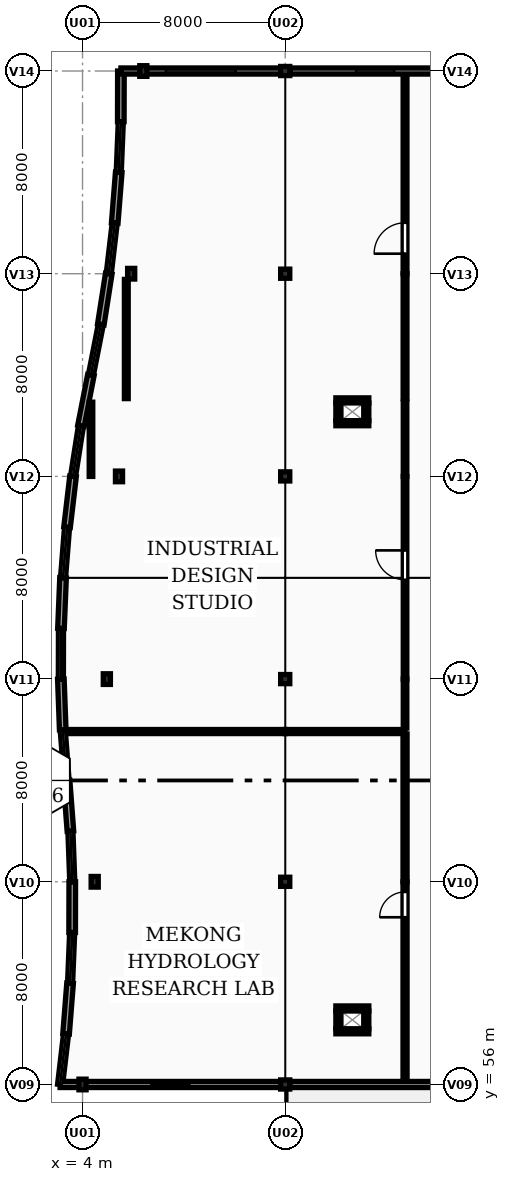
"""IFC4 building model, lengths in metres.
Left out: names, types, materials, properties, quantities, classifications, styles, units other than length and angle.
Written with IfcOpenShell. Run it as: python <this file> out.ifc"""

import sys

from ifc_helpers import new_model, si_unit, direction, frame, frame_2d, origin, origin_2d, place, context, subcontext, project, spatial, rectangle, extrude, element, fill, save


model = new_model("IFC4")
c1 = context("Model", 3, precision=1e-05, world=origin(), true_north=direction((0.0, 1.0)))
c2 = subcontext(c1, "Body", "Model", "MODEL_VIEW")
j1 = project(units=[si_unit("LENGTHUNIT", "METRE"), si_unit("PLANEANGLEUNIT", "RADIAN")], contexts=[c1])
p1 = place(None, origin())
s1 = spatial("IfcSite", under=j1, at=p1, CompositionType="ELEMENT")
p2 = place(p1, origin())
s2 = spatial("IfcBuilding", under=s1, at=p2, CompositionType="ELEMENT")
p3 = place(p2, frame((0.0, 0.0, 12.3)))
s3 = spatial("IfcBuildingStorey", under=s2, at=p3, CompositionType="ELEMENT", Elevation=12.3)
p4 = place(p3, frame((4.0, 56.0, 0.0), z_axis=(0.0, 0.0, 1.0), x_axis=(1.0, 0.0, 0.0)))
e1 = element("IfcColumn", 1, at=p4, inside=s3, PredefinedType="PILASTER", context=c2, shape_type="SweptSolid", body=[
    extrude(rectangle(XDim=0.28, YDim=0.42, at=origin_2d()), origin(), (0.0, 0.0, 1.0), 6.66),
])
p5 = place(p3, frame((4.48, 64.0, 0.0), z_axis=(0.0, 0.0, 1.0), x_axis=(1.0, 0.0, 0.0)))
e2 = element("IfcColumn", 2, at=p5, inside=s3, PredefinedType="PILASTER", context=c2, shape_type="SweptSolid", body=[
    extrude(rectangle(XDim=0.28, YDim=0.42, at=origin_2d()), origin(), (0.0, 0.0, 1.0), 6.11),
])
p6 = place(p3, frame((4.96, 72.0, 0.0), z_axis=(0.0, 0.0, 1.0), x_axis=(1.0, 0.0, 0.0)))
e3 = element("IfcColumn", 3, at=p6, inside=s3, PredefinedType="PILASTER", context=c2, shape_type="SweptSolid", body=[
    extrude(rectangle(XDim=0.28, YDim=0.42, at=origin_2d()), origin(), (0.0, 0.0, 1.0), 5.56),
])
p7 = place(p3, frame((5.44, 80.0, 0.0), z_axis=(0.0, 0.0, 1.0), x_axis=(1.0, 0.0, 0.0)))
e4 = element("IfcColumn", 4, at=p7, inside=s3, PredefinedType="PILASTER", context=c2, shape_type="SweptSolid", body=[
    extrude(rectangle(XDim=0.28, YDim=0.42, at=origin_2d()), origin(), (0.0, 0.0, 1.0), 5.549),
])
p8 = place(p3, frame((5.92, 88.0, 0.0), z_axis=(0.0, 0.0, 1.0), x_axis=(1.0, 0.0, 0.0)))
e5 = element("IfcColumn", 5, at=p8, inside=s3, PredefinedType="PILASTER", context=c2, shape_type="SweptSolid", body=[
    extrude(rectangle(XDim=0.28, YDim=0.42, at=origin_2d()), origin(), (0.0, 0.0, 1.0), 6.078),
])
p9 = place(p3, frame((6.4, 96.0, 0.0), z_axis=(0.0, 0.0, 1.0), x_axis=(1.0, 0.0, 0.0)))
e6 = element("IfcColumn", 6, at=p9, inside=s3, PredefinedType="PILASTER", context=c2, shape_type="SweptSolid", body=[
    extrude(rectangle(XDim=0.28, YDim=0.42, at=origin_2d()), origin(), (0.0, 0.0, 1.0), 6.606),
])
p10 = place(p3, frame((12.0, 56.0, 0.0), z_axis=(0.0, 0.0, 1.0), x_axis=(1.0, 0.0, 0.0)))
e7 = element("IfcColumn", 7, at=p10, inside=s3, PredefinedType="COLUMN", context=c2, shape_type="SweptSolid", body=[
    extrude(rectangle(XDim=0.36, YDim=0.36, at=origin_2d()), origin(), (0.0, 0.0, 1.0), 6.318),
])
p11 = place(p3, frame((12.0, 64.0, 0.0), z_axis=(0.0, 0.0, 1.0), x_axis=(1.0, 0.0, 0.0)))
e8 = element("IfcColumn", 8, at=p11, inside=s3, PredefinedType="COLUMN", context=c2, shape_type="SweptSolid", body=[
    extrude(rectangle(XDim=0.36, YDim=0.36, at=origin_2d()), origin(), (0.0, 0.0, 1.0), 5.789),
])
p12 = place(p3, frame((12.0, 72.0, 0.0), z_axis=(0.0, 0.0, 1.0), x_axis=(1.0, 0.0, 0.0)))
e9 = element("IfcColumn", 9, at=p12, inside=s3, PredefinedType="COLUMN", context=c2, shape_type="SweptSolid", body=[
    extrude(rectangle(XDim=0.36, YDim=0.36, at=origin_2d()), origin(), (0.0, 0.0, 1.0), 5.26),
])
p13 = place(p3, frame((12.0, 80.0, 0.0), z_axis=(0.0, 0.0, 1.0), x_axis=(1.0, 0.0, 0.0)))
e10 = element("IfcColumn", 10, at=p13, inside=s3, PredefinedType="COLUMN", context=c2, shape_type="SweptSolid", body=[
    extrude(rectangle(XDim=0.36, YDim=0.36, at=origin_2d()), origin(), (0.0, 0.0, 1.0), 5.269),
])
p14 = place(p3, frame((12.0, 88.0, 0.0), z_axis=(0.0, 0.0, 1.0), x_axis=(1.0, 0.0, 0.0)))
e11 = element("IfcColumn", 11, at=p14, inside=s3, PredefinedType="COLUMN", context=c2, shape_type="SweptSolid", body=[
    extrude(rectangle(XDim=0.36, YDim=0.36, at=origin_2d()), origin(), (0.0, 0.0, 1.0), 5.818),
])
p15 = place(p3, frame((12.0, 96.0, 0.0), z_axis=(0.0, 0.0, 1.0), x_axis=(1.0, 0.0, 0.0)))
e12 = element("IfcColumn", 12, at=p15, inside=s3, PredefinedType="COLUMN", context=c2, shape_type="SweptSolid", body=[
    extrude(rectangle(XDim=0.36, YDim=0.36, at=origin_2d()), origin(), (0.0, 0.0, 1.0), 6.367),
])
p16 = place(p3, frame((3.115, 56.0, 0.0), z_axis=(0.0, 0.0, 1.0), x_axis=(0.116988959085, 0.99313321536, 0.0)))
e13 = element("IfcWall", 13, at=p16, inside=s3, PredefinedType="SOLIDWALL", context=c2, shape_type="SweptSolid", body=[
    extrude(rectangle(XDim=2.014, YDim=0.2, at=frame_2d((1.007, 0.0))), origin(), (0.0, 0.0, 1.0), 0.95),
])
p17 = place(p3, frame((3.351, 58.0, 0.0), z_axis=(0.0, 0.0, 1.0), x_axis=(0.078976178075, 0.996876503533, 0.0)))
e14 = element("IfcWall", 14, at=p17, inside=s3, PredefinedType="SOLIDWALL", context=c2, shape_type="SweptSolid", body=[
    extrude(rectangle(XDim=2.006, YDim=0.26, at=frame_2d((1.003, 0.0))), origin(), (0.0, 0.0, 1.0), 6.416),
])
p18 = place(p3, frame((3.509, 60.0, 0.0), z_axis=(0.0, 0.0, 1.0), x_axis=(0.040737639062, 0.99916987783, 0.0)))
e15 = element("IfcWall", 15, at=p18, inside=s3, PredefinedType="SOLIDWALL", context=c2, shape_type="SweptSolid", body=[
    extrude(rectangle(XDim=2.002, YDim=0.2, at=frame_2d((1.001, 0.0))), origin(), (0.0, 0.0, 1.0), 0.95),
])
p19 = place(p3, frame((3.591, 62.0, 0.0), z_axis=(0.0, 0.0, 1.0), x_axis=(0.002197260321, 0.999997586021, 0.0)))
e16 = element("IfcWall", 16, at=p19, inside=s3, PredefinedType="SOLIDWALL", context=c2, shape_type="SweptSolid", body=[
    extrude(rectangle(XDim=2.0, YDim=0.26, at=frame_2d((1.0, 0.0))), origin(), (0.0, 0.0, 1.0), 6.147),
])
p20 = place(p3, frame((3.595, 64.0, 0.0), z_axis=(0.0, 0.0, 1.0), x_axis=(-0.036596562065, 0.999330121454, 0.0)))
e17 = element("IfcWall", 17, at=p20, inside=s3, PredefinedType="SOLIDWALL", context=c2, shape_type="SweptSolid", body=[
    extrude(rectangle(XDim=2.001, YDim=0.2, at=frame_2d((1.0, 0.0))), origin(), (0.0, 0.0, 1.0), 0.95),
])
p21 = place(p3, frame((3.522, 66.0, 0.0), z_axis=(0.0, 0.0, 1.0), x_axis=(-0.075588789742, 0.997139074987, 0.0)))
e18 = element("IfcWall", 18, at=p21, inside=s3, PredefinedType="SOLIDWALL", context=c2, shape_type="SweptSolid", body=[
    extrude(rectangle(XDim=2.006, YDim=0.26, at=frame_2d((1.003, 0.0))), origin(), (0.0, 0.0, 1.0), 5.892),
])
p22 = place(p3, frame((3.37, 68.0, 0.0), z_axis=(0.0, 0.0, 1.0), x_axis=(-0.075709813676, 0.9971298933, 0.0)))
e19 = element("IfcWall", 19, at=p22, inside=s3, PredefinedType="SOLIDWALL", context=c2, shape_type="SweptSolid", body=[
    extrude(rectangle(XDim=2.006, YDim=0.2, at=frame_2d((1.003, 0.0))), origin(), (0.0, 0.0, 1.0), 0.95),
])
p23 = place(p3, frame((3.218, 70.0, 0.0), z_axis=(0.0, 0.0, 1.0), x_axis=(-0.036596562065, 0.999330121454, 0.0)))
e20 = element("IfcWall", 20, at=p23, inside=s3, PredefinedType="SOLIDWALL", context=c2, shape_type="SweptSolid", body=[
    extrude(rectangle(XDim=2.001, YDim=0.26, at=frame_2d((1.0, 0.0))), origin(), (0.0, 0.0, 1.0), 5.637),
])
p24 = place(p3, frame((3.145, 72.0, 0.0), z_axis=(0.0, 0.0, 1.0), x_axis=(0.002197260321, 0.999997586021, 0.0)))
e21 = element("IfcWall", 21, at=p24, inside=s3, PredefinedType="SOLIDWALL", context=c2, shape_type="SweptSolid", body=[
    extrude(rectangle(XDim=2.0, YDim=0.2, at=frame_2d((1.0, 0.0))), origin(), (0.0, 0.0, 1.0), 0.95),
])
p25 = place(p3, frame((3.149, 74.0, 0.0), z_axis=(0.0, 0.0, 1.0), x_axis=(0.040737639062, 0.99916987783, 0.0)))
e22 = element("IfcWall", 22, at=p25, inside=s3, PredefinedType="SOLIDWALL", context=c2, shape_type="SweptSolid", body=[
    extrude(rectangle(XDim=2.002, YDim=0.26, at=frame_2d((1.001, 0.0))), origin(), (0.0, 0.0, 1.0), 5.369),
])
p26 = place(p3, frame((3.231, 76.0, 0.0), z_axis=(0.0, 0.0, 1.0), x_axis=(0.078976178075, 0.996876503533, 0.0)))
e23 = element("IfcWall", 23, at=p26, inside=s3, PredefinedType="SOLIDWALL", context=c2, shape_type="SweptSolid", body=[
    extrude(rectangle(XDim=2.006, YDim=0.2, at=frame_2d((1.003, 0.0))), origin(), (0.0, 0.0, 1.0), 0.95),
])
p27 = place(p3, frame((3.389, 78.0, 0.0), z_axis=(0.0, 0.0, 1.0), x_axis=(0.116988959085, 0.99313321536, 0.0)))
e24 = element("IfcWall", 24, at=p27, inside=s3, PredefinedType="SOLIDWALL", context=c2, shape_type="SweptSolid", body=[
    extrude(rectangle(XDim=2.014, YDim=0.26, at=frame_2d((1.007, 0.0))), origin(), (0.0, 0.0, 1.0), 5.499),
])
p28 = place(p3, frame((3.625, 80.0, 0.0), z_axis=(0.0, 0.0, 1.0), x_axis=(0.15473004848, 0.987956786554, 0.0)))
e25 = element("IfcWall", 25, at=p28, inside=s3, PredefinedType="SOLIDWALL", context=c2, shape_type="SweptSolid", body=[
    extrude(rectangle(XDim=2.024, YDim=0.2, at=frame_2d((1.012, 0.0))), origin(), (0.0, 0.0, 1.0), 0.95),
])
p29 = place(p3, frame((3.938, 82.0, 0.0), z_axis=(0.0, 0.0, 1.0), x_axis=(0.192267434085, 0.981342566992, 0.0)))
e26 = element("IfcWall", 26, at=p29, inside=s3, PredefinedType="SOLIDWALL", context=c2, shape_type="SweptSolid", body=[
    extrude(rectangle(XDim=2.038, YDim=0.26, at=frame_2d((1.019, 0.0))), origin(), (0.0, 0.0, 1.0), 5.75),
])
p30 = place(p3, frame((4.33, 84.0, 0.0), z_axis=(0.0, 0.0, 1.0), x_axis=(0.192152065658, 0.981365163262, 0.0)))
e27 = element("IfcWall", 27, at=p30, inside=s3, PredefinedType="SOLIDWALL", context=c2, shape_type="SweptSolid", body=[
    extrude(rectangle(XDim=2.038, YDim=0.2, at=frame_2d((1.019, 0.0))), origin(), (0.0, 0.0, 1.0), 0.95),
])
p31 = place(p3, frame((4.722, 86.0, 0.0), z_axis=(0.0, 0.0, 1.0), x_axis=(0.15473004848, 0.987956786554, 0.0)))
e28 = element("IfcWall", 28, at=p31, inside=s3, PredefinedType="SOLIDWALL", context=c2, shape_type="SweptSolid", body=[
    extrude(rectangle(XDim=2.024, YDim=0.26, at=frame_2d((1.012, 0.0))), origin(), (0.0, 0.0, 1.0), 5.991),
])
p32 = place(p3, frame((5.035, 88.0, 0.0), z_axis=(0.0, 0.0, 1.0), x_axis=(0.116988959085, 0.99313321536, 0.0)))
e29 = element("IfcWall", 29, at=p32, inside=s3, PredefinedType="SOLIDWALL", context=c2, shape_type="SweptSolid", body=[
    extrude(rectangle(XDim=2.014, YDim=0.2, at=frame_2d((1.007, 0.0))), origin(), (0.0, 0.0, 1.0), 0.95),
])
p33 = place(p3, frame((5.271, 90.0, 0.0), z_axis=(0.0, 0.0, 1.0), x_axis=(0.079097106354, 0.996866915775, 0.0)))
e30 = element("IfcWall", 30, at=p33, inside=s3, PredefinedType="SOLIDWALL", context=c2, shape_type="SweptSolid", body=[
    extrude(rectangle(XDim=2.006, YDim=0.26, at=frame_2d((1.003, 0.0))), origin(), (0.0, 0.0, 1.0), 6.242),
])
p34 = place(p3, frame((5.429, 92.0, 0.0), z_axis=(0.0, 0.0, 1.0), x_axis=(0.04061587159, 0.999174835039, 0.0)))
e31 = element("IfcWall", 31, at=p34, inside=s3, PredefinedType="SOLIDWALL", context=c2, shape_type="SweptSolid", body=[
    extrude(rectangle(XDim=2.002, YDim=0.2, at=frame_2d((1.001, 0.0))), origin(), (0.0, 0.0, 1.0), 0.95),
])
p35 = place(p3, frame((5.51, 94.0, 0.0), z_axis=(0.0, 0.0, 1.0), x_axis=(0.002197260321, 0.999997586021, 0.0)))
e32 = element("IfcWall", 32, at=p35, inside=s3, PredefinedType="SOLIDWALL", context=c2, shape_type="SweptSolid", body=[
    extrude(rectangle(XDim=2.0, YDim=0.26, at=frame_2d((1.0, 0.0))), origin(), (0.0, 0.0, 1.0), 6.507),
])
p36 = place(p3, frame((5.515, 96.0, 0.0), z_axis=(0.0, 0.0, 1.0), x_axis=(1.0, 0.0, 0.0)))
e33 = element("IfcWall", 33, at=p36, inside=s3, PredefinedType="SOLIDWALL", context=c2, shape_type="SweptSolid", body=[
    extrude(rectangle(XDim=6.305, YDim=0.24, at=frame_2d((3.153, 0.0))), origin(), (0.0, 0.0, 1.0), 5.785),
])
p37 = place(p36, frame((1.778, 0.0, 0.95)))
e34 = element("IfcOpeningElement", 34, at=p37, cuts=e33, PredefinedType="OPENING", context=c2, shape_type="SweptSolid", body=[
    extrude(rectangle(XDim=2.75, YDim=1.65, at=frame_2d((1.375, 0.825))), frame((0.0, 0.13, 0.0), z_axis=(0.0, -1.0, 0.0), x_axis=(1.0, 0.0, 0.0)), (0.0, 0.0, 1.0), 0.26),
])
p38 = place(p3, frame((12.18, 96.0, 0.0), z_axis=(0.0, 0.0, 1.0), x_axis=(1.0, 0.0, 0.0)))
e35 = element("IfcWall", 35, at=p38, inside=s3, PredefinedType="SOLIDWALL", context=c2, shape_type="SweptSolid", body=[
    extrude(rectangle(XDim=7.64, YDim=0.24, at=frame_2d((3.82, 0.0))), origin(), (0.0, 0.0, 1.0), 5.444),
])
p39 = place(p38, frame((2.62, 0.0, 0.95)))
e36 = element("IfcOpeningElement", 36, at=p39, cuts=e35, PredefinedType="OPENING", context=c2, shape_type="SweptSolid", body=[
    extrude(rectangle(XDim=1.5, YDim=1.35, at=frame_2d((0.75, 0.675))), frame((0.0, 0.13, 0.0), z_axis=(0.0, -1.0, 0.0), x_axis=(1.0, 0.0, 0.0)), (0.0, 0.0, 1.0), 0.26),
])
p40 = place(p3, frame((19.82, 56.0, 0.0), z_axis=(0.0, 0.0, 1.0), x_axis=(-1.0, 0.0, 0.0)))
e37 = element("IfcWall", 37, at=p40, inside=s3, PredefinedType="SOLIDWALL", context=c2, shape_type="SweptSolid", body=[
    extrude(rectangle(XDim=7.64, YDim=0.24, at=frame_2d((3.82, 0.0))), origin(), (0.0, 0.0, 1.0), 5.395),
])
p41 = place(p3, frame((11.82, 56.0, 0.0), z_axis=(0.0, 0.0, 1.0), x_axis=(-1.0, 0.0, 0.0)))
e38 = element("IfcWall", 38, at=p41, inside=s3, PredefinedType="SOLIDWALL", context=c2, shape_type="SweptSolid", body=[
    extrude(rectangle(XDim=8.705, YDim=0.24, at=frame_2d((4.353, 0.0))), origin(), (0.0, 0.0, 1.0), 5.736),
])
p42 = place(p41, frame((3.603, 0.0, 0.95)))
e39 = element("IfcOpeningElement", 39, at=p42, cuts=e38, PredefinedType="OPENING", context=c2, shape_type="SweptSolid", body=[
    extrude(rectangle(XDim=1.5, YDim=1.2, at=frame_2d((0.75, 0.6))), frame((0.0, 0.13, 0.0), z_axis=(0.0, -1.0, 0.0), x_axis=(1.0, 0.0, 0.0)), (0.0, 0.0, 1.0), 0.26),
])
for number, where, z_axis, x_axis in (
    (40, (15.3, 58.1, 0.0), (0.0, 0.0, 1.0), (-1.0, 0.0, 0.0)),
    (41, (14.0, 59.0, 0.0), (0.0, 0.0, 1.0), (1.0, 0.0, 0.0)),
):
    element("IfcWall", number, at=place(p3, frame(where, z_axis=z_axis, x_axis=x_axis)), inside=s3, PredefinedType="PARTITIONING", context=c2, shape_type="SweptSolid", body=[
        extrude(rectangle(XDim=1.3, YDim=0.2, at=frame_2d((0.65, 0.0))), origin(), (0.0, 0.0, 1.0), 3.65),
    ])
for number, where, z_axis, x_axis in (
    (42, (14.1, 58.2, 0.0), (0.0, 0.0, 1.0), (0.0, 1.0, 0.0)),
    (43, (15.2, 58.9, 0.0), (0.0, 0.0, 1.0), (0.0, -1.0, 0.0)),
):
    element("IfcWall", number, at=place(p3, frame(where, z_axis=z_axis, x_axis=x_axis)), inside=s3, PredefinedType="PARTITIONING", context=c2, shape_type="SweptSolid", body=[
        extrude(rectangle(XDim=0.7, YDim=0.2, at=frame_2d((0.35, 0.0))), origin(), (0.0, 0.0, 1.0), 3.65),
    ])
for number, where, z_axis, x_axis in (
    (44, (15.3, 82.1, 0.0), (0.0, 0.0, 1.0), (-1.0, 0.0, 0.0)),
    (45, (14.0, 83.0, 0.0), (0.0, 0.0, 1.0), (1.0, 0.0, 0.0)),
):
    element("IfcWall", number, at=place(p3, frame(where, z_axis=z_axis, x_axis=x_axis)), inside=s3, PredefinedType="PARTITIONING", context=c2, shape_type="SweptSolid", body=[
        extrude(rectangle(XDim=1.3, YDim=0.2, at=frame_2d((0.65, 0.0))), origin(), (0.0, 0.0, 1.0), 3.65),
    ])
for number, where, z_axis, x_axis in (
    (46, (14.1, 82.2, 0.0), (0.0, 0.0, 1.0), (0.0, 1.0, 0.0)),
    (47, (15.2, 82.9, 0.0), (0.0, 0.0, 1.0), (0.0, -1.0, 0.0)),
):
    element("IfcWall", number, at=place(p3, frame(where, z_axis=z_axis, x_axis=x_axis)), inside=s3, PredefinedType="PARTITIONING", context=c2, shape_type="SweptSolid", body=[
        extrude(rectangle(XDim=0.7, YDim=0.2, at=frame_2d((0.35, 0.0))), origin(), (0.0, 0.0, 1.0), 3.65),
    ])
p43 = place(p3, frame((3.393, 69.93, 0.0), z_axis=(0.0, 0.0, 1.0), x_axis=(1.0, 0.0, 0.0)))
e48 = element("IfcWall", 48, at=p43, inside=s3, PredefinedType="PARTITIONING", context=c2, shape_type="SweptSolid", body=[
    extrude(rectangle(XDim=8.607, YDim=0.16, at=frame_2d((4.304, 0.0))), origin(), (0.0, 0.0, 1.0), 3.65),
])
p44 = place(p3, frame((12.0, 69.93, 0.0), z_axis=(0.0, 0.0, 1.0), x_axis=(1.0, 0.0, 0.0)))
e49 = element("IfcWall", 49, at=p44, inside=s3, PredefinedType="PARTITIONING", context=c2, shape_type="SweptSolid", body=[
    extrude(rectangle(XDim=4.73, YDim=0.16, at=frame_2d((2.365, 0.0))), origin(), (0.0, 0.0, 1.0), 3.65),
])
p45 = place(p3, frame((16.73, 56.162, 0.0), z_axis=(0.0, 0.0, 1.0), x_axis=(0.0, 1.0, 0.0)))
e50 = element("IfcWall", 50, at=p45, inside=s3, PredefinedType="PARTITIONING", context=c2, shape_type="SweptSolid", body=[
    extrude(rectangle(XDim=7.838, YDim=0.16, at=frame_2d((3.919, 0.0))), origin(), (0.0, 0.0, 1.0), 3.65),
])
p46 = place(p45, frame((6.438, 0.0, 0.0)))
e51 = element("IfcOpeningElement", 51, at=p46, cuts=e50, PredefinedType="OPENING", context=c2, shape_type="SweptSolid", body=[
    extrude(rectangle(XDim=1.0, YDim=2.15, at=frame_2d((0.5, 1.075))), frame((0.0, 0.09, 0.0), z_axis=(0.0, -1.0, 0.0), x_axis=(1.0, 0.0, 0.0)), (0.0, 0.0, 1.0), 0.18),
])
p47 = place(p3, frame((16.73, 64.0, 0.0), z_axis=(0.0, 0.0, 1.0), x_axis=(0.0, 1.0, 0.0)))
e52 = element("IfcWall", 52, at=p47, inside=s3, PredefinedType="PARTITIONING", context=c2, shape_type="SweptSolid", body=[
    extrude(rectangle(XDim=5.835, YDim=0.16, at=frame_2d((2.917, 0.0))), origin(), (0.0, 0.0, 1.0), 3.65),
])
p48 = place(p3, frame((4.334, 80.0, 0.0), z_axis=(0.0, 0.0, 1.0), x_axis=(0.0, 1.0, 0.0)))
e53 = element("IfcWall", 53, at=p48, inside=s3, PredefinedType="PARTITIONING", context=c2, shape_type="SweptSolid", body=[
    extrude(rectangle(XDim=2.93, YDim=0.14, at=frame_2d((1.465, 0.0))), origin(), (0.0, 0.0, 1.0), 3.65),
])
p49 = place(p3, frame((16.73, 70.07, 0.0), z_axis=(0.0, 0.0, 1.0), x_axis=(0.0, 1.0, 0.0)))
e54 = element("IfcWall", 54, at=p49, inside=s3, PredefinedType="PARTITIONING", context=c2, shape_type="SweptSolid", body=[
    extrude(rectangle(XDim=1.93, YDim=0.14, at=frame_2d((0.965, 0.0))), origin(), (0.0, 0.0, 1.0), 3.65),
])
p50 = place(p3, frame((16.73, 72.0, 0.0), z_axis=(0.0, 0.0, 1.0), x_axis=(0.0, 1.0, 0.0)))
e55 = element("IfcWall", 55, at=p50, inside=s3, PredefinedType="PARTITIONING", context=c2, shape_type="SweptSolid", body=[
    extrude(rectangle(XDim=8.0, YDim=0.14, at=frame_2d((4.0, 0.0))), origin(), (0.0, 0.0, 1.0), 3.65),
])
p51 = place(p50, frame((3.92, 0.0, 0.0)))
e56 = element("IfcOpeningElement", 56, at=p51, cuts=e55, PredefinedType="OPENING", context=c2, shape_type="SweptSolid", body=[
    extrude(rectangle(XDim=1.16, YDim=2.15, at=frame_2d((0.58, 1.075))), frame((0.0, 0.08, 0.0), z_axis=(0.0, -1.0, 0.0), x_axis=(1.0, 0.0, 0.0)), (0.0, 0.0, 1.0), 0.16),
])
p52 = place(p3, frame((16.73, 80.0, 0.0), z_axis=(0.0, 0.0, 1.0), x_axis=(0.0, 1.0, 0.0)))
e57 = element("IfcWall", 57, at=p52, inside=s3, PredefinedType="PARTITIONING", context=c2, shape_type="SweptSolid", body=[
    extrude(rectangle(XDim=2.93, YDim=0.14, at=frame_2d((1.465, 0.0))), origin(), (0.0, 0.0, 1.0), 3.65),
])
p53 = place(p3, frame((5.728, 83.07, 0.0), z_axis=(0.0, 0.0, 1.0), x_axis=(0.0, 1.0, 0.0)))
e58 = element("IfcWall", 58, at=p53, inside=s3, PredefinedType="PARTITIONING", context=c2, shape_type="SweptSolid", body=[
    extrude(rectangle(XDim=4.705, YDim=0.15, at=frame_2d((2.353, 0.0))), origin(), (0.0, 0.0, 1.0), 3.65),
])
p54 = place(p3, frame((16.73, 83.07, 0.0), z_axis=(0.0, 0.0, 1.0), x_axis=(0.0, 1.0, 0.0)))
e59 = element("IfcWall", 59, at=p54, inside=s3, PredefinedType="PARTITIONING", context=c2, shape_type="SweptSolid", body=[
    extrude(rectangle(XDim=4.93, YDim=0.15, at=frame_2d((2.465, 0.0))), origin(), (0.0, 0.0, 1.0), 3.65),
])
p55 = place(p3, frame((16.73, 88.0, 0.0), z_axis=(0.0, 0.0, 1.0), x_axis=(0.0, 1.0, 0.0)))
e60 = element("IfcWall", 60, at=p55, inside=s3, PredefinedType="PARTITIONING", context=c2, shape_type="SweptSolid", body=[
    extrude(rectangle(XDim=7.838, YDim=0.15, at=frame_2d((3.919, 0.0))), origin(), (0.0, 0.0, 1.0), 3.65),
])
p56 = place(p55, frame((0.79, 0.0, 0.0)))
e61 = element("IfcOpeningElement", 61, at=p56, cuts=e60, PredefinedType="OPENING", context=c2, shape_type="SweptSolid", body=[
    extrude(rectangle(XDim=1.22, YDim=2.15, at=frame_2d((0.61, 1.075))), frame((0.0, 0.085, 0.0), z_axis=(0.0, -1.0, 0.0), x_axis=(1.0, 0.0, 0.0)), (0.0, 0.0, 1.0), 0.17),
])
p57 = place(p37, origin())
e62 = element("IfcWindow", 62, at=p57, inside=s3, PartitioningType="DOUBLE_PANEL_VERTICAL", PredefinedType="WINDOW", context=c2, shape_type="SweptSolid", body=[
    extrude(rectangle(XDim=2.75, YDim=1.65, at=frame_2d((1.375, 0.825))), frame((0.0, 0.03, 0.0), z_axis=(0.0, -1.0, 0.0), x_axis=(1.0, 0.0, 0.0)), (0.0, 0.0, 1.0), 0.06),
])
fill(e34, e62)
p58 = place(p39, origin())
e63 = element("IfcWindow", 63, at=p58, inside=s3, PartitioningType="SINGLE_PANEL", PredefinedType="WINDOW", context=c2, shape_type="SweptSolid", body=[
    extrude(rectangle(XDim=1.5, YDim=1.35, at=frame_2d((0.75, 0.675))), frame((0.0, 0.03, 0.0), z_axis=(0.0, -1.0, 0.0), x_axis=(1.0, 0.0, 0.0)), (0.0, 0.0, 1.0), 0.06),
])
fill(e36, e63)
p59 = place(p42, origin())
e64 = element("IfcWindow", 64, at=p59, inside=s3, PartitioningType="SINGLE_PANEL", PredefinedType="WINDOW", context=c2, shape_type="SweptSolid", body=[
    extrude(rectangle(XDim=1.5, YDim=1.2, at=frame_2d((0.75, 0.6))), frame((0.0, 0.03, 0.0), z_axis=(0.0, -1.0, 0.0), x_axis=(1.0, 0.0, 0.0)), (0.0, 0.0, 1.0), 0.06),
])
fill(e39, e64)
p60 = place(p46, origin())
e65 = element("IfcDoor", 65, at=p60, inside=s3, OperationType="SINGLE_SWING_LEFT", PredefinedType="DOOR", context=c2, shape_type="SweptSolid", body=[
    extrude(rectangle(XDim=1.0, YDim=2.15, at=frame_2d((0.5, 1.075))), frame((0.0, 0.025, 0.0), z_axis=(0.0, -1.0, 0.0), x_axis=(1.0, 0.0, 0.0)), (0.0, 0.0, 1.0), 0.05),
])
fill(e51, e65)
p61 = place(p51, origin())
e66 = element("IfcDoor", 66, at=p61, inside=s3, OperationType="SINGLE_SWING_RIGHT", PredefinedType="DOOR", context=c2, shape_type="SweptSolid", body=[
    extrude(rectangle(XDim=1.16, YDim=2.15, at=frame_2d((0.58, 1.075))), frame((0.0, 0.025, 0.0), z_axis=(0.0, -1.0, 0.0), x_axis=(1.0, 0.0, 0.0)), (0.0, 0.0, 1.0), 0.05),
])
fill(e56, e66)
p62 = place(p56, origin())
e67 = element("IfcDoor", 67, at=p62, inside=s3, OperationType="SINGLE_SWING_LEFT", PredefinedType="DOOR", context=c2, shape_type="SweptSolid", body=[
    extrude(rectangle(XDim=1.22, YDim=2.15, at=frame_2d((0.61, 1.075))), frame((0.0, 0.025, 0.0), z_axis=(0.0, -1.0, 0.0), x_axis=(1.0, 0.0, 0.0)), (0.0, 0.0, 1.0), 0.05),
])
fill(e61, e67)
save(model, sys.argv[1])
